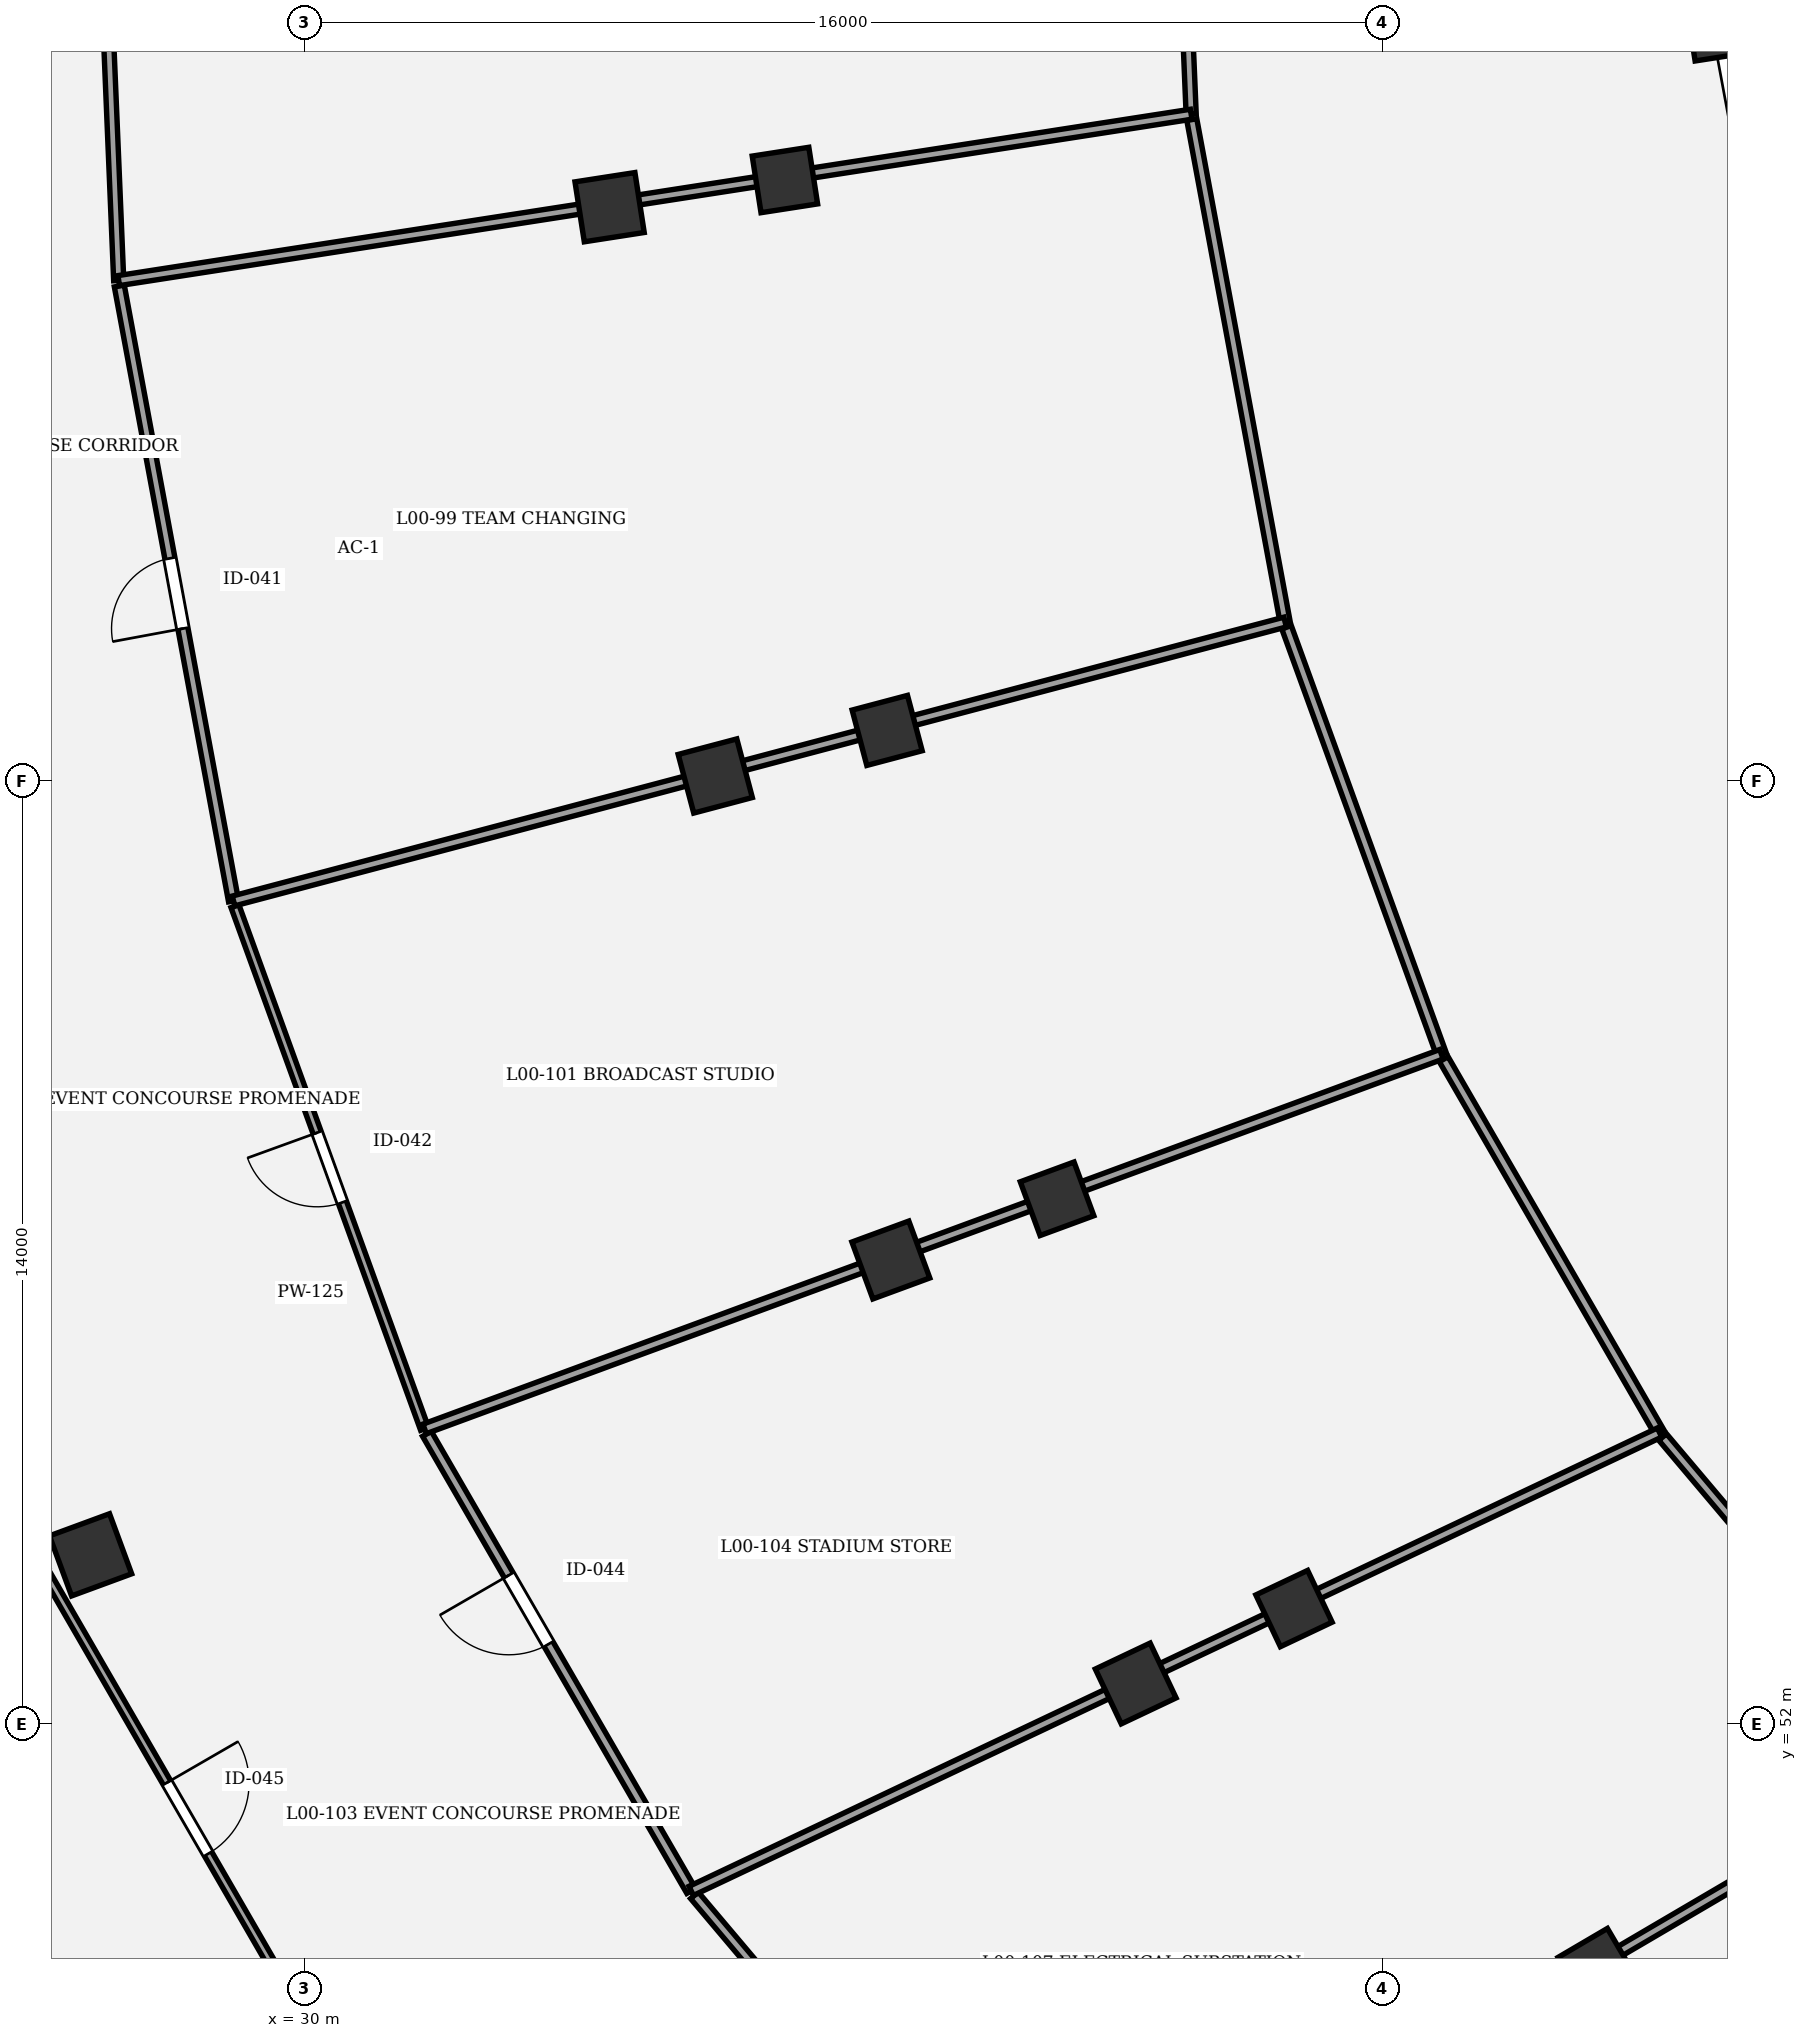
"""IFC4 building model, lengths in metres.
Left out: names, types, materials, properties, quantities, classifications, styles, units other than length and angle.
Written with IfcOpenShell. Run it as: python <this file> out.ifc"""

import sys

from ifc_helpers import new_model, si_unit, direction, frame, frame_2d, origin, origin_2d, place, context, subcontext, project, spatial, rectangle, extrude, element, fill, save


model = new_model("IFC4")
c1 = context("Model", 3, precision=1e-05, world=origin(), true_north=direction((0.0, 1.0)))
c2 = subcontext(c1, "Body", "Model", "MODEL_VIEW")
j1 = project(units=[si_unit("LENGTHUNIT", "METRE"), si_unit("PLANEANGLEUNIT", "RADIAN")], contexts=[c1])
p1 = place(None, origin())
s1 = spatial("IfcSite", under=j1, at=p1, CompositionType="ELEMENT")
p2 = place(p1, origin())
s2 = spatial("IfcBuilding", under=s1, at=p2, CompositionType="ELEMENT")
p3 = place(p2, origin())
s3 = spatial("IfcBuildingStorey", under=s2, at=p3, CompositionType="ELEMENT", Elevation=0.0)
p4 = place(p3, frame((50.912, 77.06, 0.0), z_axis=(0.0, 0.0, 1.0), x_axis=(-0.98817491911, -0.153330783737, 0.0)))
e1 = element("IfcColumn", 1, at=p4, inside=s3, PredefinedType="COLUMN", context=c2, shape_type="SweptSolid", body=[
    extrude(rectangle(XDim=0.65, YDim=0.65, at=origin_2d()), origin(), (0.0, 0.0, 1.0), 1.15),
])
p5 = place(p3, frame((37.131, 74.922, 0.0), z_axis=(0.0, 0.0, 1.0), x_axis=(-0.98817491911, -0.153330783737, 0.0)))
e2 = element("IfcColumn", 2, at=p5, inside=s3, PredefinedType="COLUMN", context=c2, shape_type="SweptSolid", body=[
    extrude(rectangle(XDim=0.85, YDim=0.85, at=origin_2d()), origin(), (0.0, 0.0, 1.0), 5.4),
])
p6 = place(p3, frame((34.529, 74.518, 0.0), z_axis=(0.0, 0.0, 1.0), x_axis=(-0.98817491911, -0.153330783737, 0.0)))
e3 = element("IfcColumn", 3, at=p6, inside=s3, PredefinedType="COLUMN", context=c2, shape_type="SweptSolid", body=[
    extrude(rectangle(XDim=0.9, YDim=0.9, at=origin_2d()), origin(), (0.0, 0.0, 1.0), 5.4),
])
p7 = place(p3, frame((38.648, 66.752, 0.0), z_axis=(0.0, 0.0, 1.0), x_axis=(-0.966600102017, -0.256289373133, 0.0)))
e4 = element("IfcColumn", 4, at=p7, inside=s3, PredefinedType="COLUMN", context=c2, shape_type="SweptSolid", body=[
    extrude(rectangle(XDim=0.85, YDim=0.85, at=origin_2d()), origin(), (0.0, 0.0, 1.0), 5.4),
])
p8 = place(p3, frame((36.097, 66.076, 0.0), z_axis=(0.0, 0.0, 1.0), x_axis=(-0.966600102017, -0.256289373133, 0.0)))
e5 = element("IfcColumn", 5, at=p8, inside=s3, PredefinedType="COLUMN", context=c2, shape_type="SweptSolid", body=[
    extrude(rectangle(XDim=0.9, YDim=0.9, at=origin_2d()), origin(), (0.0, 0.0, 1.0), 5.4),
])
p9 = place(p3, frame((41.17, 59.801, 0.0), z_axis=(0.0, 0.0, 1.0), x_axis=(-0.938372433776, -0.34562577382, 0.0)))
e6 = element("IfcColumn", 6, at=p9, inside=s3, PredefinedType="COLUMN", context=c2, shape_type="SweptSolid", body=[
    extrude(rectangle(XDim=0.85, YDim=0.85, at=origin_2d()), origin(), (0.0, 0.0, 1.0), 5.4),
])
p10 = place(p3, frame((38.703, 58.892, 0.0), z_axis=(0.0, 0.0, 1.0), x_axis=(-0.938372433776, -0.34562577382, 0.0)))
e7 = element("IfcColumn", 7, at=p10, inside=s3, PredefinedType="COLUMN", context=c2, shape_type="SweptSolid", body=[
    extrude(rectangle(XDim=0.9, YDim=0.9, at=origin_2d()), origin(), (0.0, 0.0, 1.0), 5.4),
])
p11 = place(p3, frame((26.824, 54.516, 0.0), z_axis=(0.0, 0.0, 1.0), x_axis=(-0.938372433776, -0.34562577382, 0.0)))
e8 = element("IfcColumn", 8, at=p11, inside=s3, PredefinedType="COLUMN", context=c2, shape_type="SweptSolid", body=[
    extrude(rectangle(XDim=0.95, YDim=0.95, at=origin_2d()), origin(), (0.0, 0.0, 1.0), 5.4),
])
p12 = place(p3, frame((44.687, 53.719, 0.0), z_axis=(0.0, 0.0, 1.0), x_axis=(-0.903858661687, -0.4278311813, 0.0)))
e9 = element("IfcColumn", 9, at=p12, inside=s3, PredefinedType="COLUMN", context=c2, shape_type="SweptSolid", body=[
    extrude(rectangle(XDim=0.85, YDim=0.85, at=origin_2d()), origin(), (0.0, 0.0, 1.0), 5.4),
])
p13 = place(p3, frame((42.337, 52.606, 0.0), z_axis=(0.0, 0.0, 1.0), x_axis=(-0.903858661687, -0.4278311813, 0.0)))
e10 = element("IfcColumn", 10, at=p13, inside=s3, PredefinedType="COLUMN", context=c2, shape_type="SweptSolid", body=[
    extrude(rectangle(XDim=0.9, YDim=0.9, at=origin_2d()), origin(), (0.0, 0.0, 1.0), 5.4),
])
p14 = place(p3, frame((49.188, 48.389, 0.0), z_axis=(0.0, 0.0, 1.0), x_axis=(-0.862513669207, -0.506033764121, 0.0)))
e11 = element("IfcColumn", 11, at=p14, inside=s3, PredefinedType="COLUMN", context=c2, shape_type="SweptSolid", body=[
    extrude(rectangle(XDim=0.85, YDim=0.85, at=origin_2d()), origin(), (0.0, 0.0, 1.0), 5.4),
])
p15 = place(p3, frame((27.242, 73.429, 0.0), z_axis=(0.0, 0.0, 1.0), x_axis=(-0.041894479342, 0.999122040894, 0.0)))
e12 = element("IfcWall", 12, at=p15, inside=s3, PredefinedType="PARTITIONING", context=c2, shape_type="SweptSolid", body=[
    extrude(rectangle(XDim=13.543, YDim=0.15, at=frame_2d((6.771, 0.0))), origin(), (0.0, 0.0, 1.0), 4.15),
])
p16 = place(p15, frame((6.262, 0.0, 0.0)))
e13 = element("IfcOpeningElement", 13, at=p16, cuts=e12, PredefinedType="OPENING", context=c2, shape_type="SweptSolid", body=[
    extrude(rectangle(XDim=1.02, YDim=2.1, at=frame_2d((0.51, 1.05))), frame((0.0, 0.085, 0.0), z_axis=(0.0, -1.0, 0.0), x_axis=(1.0, 0.0, 0.0)), (0.0, 0.0, 1.0), 0.17),
])
p17 = place(p3, frame((28.947, 64.221, 0.0), z_axis=(0.0, 0.0, 1.0), x_axis=(-0.182600545941, 0.983187184936, 0.0)))
e14 = element("IfcWall", 14, at=p17, inside=s3, PredefinedType="PARTITIONING", context=c2, shape_type="SweptSolid", body=[
    extrude(rectangle(XDim=9.284, YDim=0.15, at=frame_2d((4.642, 0.0))), origin(), (0.0, 0.0, 1.0), 4.15),
])
p18 = place(p17, frame((4.112, 0.0, 0.0)))
e15 = element("IfcOpeningElement", 15, at=p18, cuts=e14, PredefinedType="OPENING", context=c2, shape_type="SweptSolid", body=[
    extrude(rectangle(XDim=1.06, YDim=2.1, at=frame_2d((0.53, 1.05))), frame((0.0, 0.085, 0.0), z_axis=(0.0, -1.0, 0.0), x_axis=(1.0, 0.0, 0.0)), (0.0, 0.0, 1.0), 0.17),
])
p19 = place(p3, frame((31.782, 56.385, 0.0), z_axis=(0.0, 0.0, 1.0), x_axis=(-0.341044733968, 0.940047067669, 0.0)))
e16 = element("IfcWall", 16, at=p19, inside=s3, PredefinedType="PARTITIONING", context=c2, shape_type="SweptSolid", body=[
    extrude(rectangle(XDim=8.254, YDim=0.125, at=frame_2d((4.127, 0.0))), origin(), (0.0, 0.0, 1.0), 4.15),
])
p20 = place(p19, frame((3.577, 0.0, 0.0)))
e17 = element("IfcOpeningElement", 17, at=p20, cuts=e16, PredefinedType="OPENING", context=c2, shape_type="SweptSolid", body=[
    extrude(rectangle(XDim=1.1, YDim=2.1, at=frame_2d((0.55, 1.05))), frame((0.0, 0.073, 0.0), z_axis=(0.0, -1.0, 0.0), x_axis=(1.0, 0.0, 0.0)), (0.0, 0.0, 1.0), 0.145),
])
p21 = place(p3, frame((35.74, 49.528, 0.0), z_axis=(0.0, 0.0, 1.0), x_axis=(-0.500584301803, 0.865687794063, 0.0)))
e18 = element("IfcWall", 18, at=p21, inside=s3, PredefinedType="PARTITIONING", context=c2, shape_type="SweptSolid", body=[
    extrude(rectangle(XDim=7.837, YDim=0.15, at=frame_2d((3.918, 0.0))), origin(), (0.0, 0.0, 1.0), 4.15),
])
p22 = place(p21, frame((4.231, 0.0, 0.0)))
e19 = element("IfcOpeningElement", 19, at=p22, cuts=e18, PredefinedType="OPENING", context=c2, shape_type="SweptSolid", body=[
    extrude(rectangle(XDim=1.18, YDim=2.1, at=frame_2d((0.59, 1.05))), frame((0.0, 0.085, 0.0), z_axis=(0.0, -1.0, 0.0), x_axis=(1.0, 0.0, 0.0)), (0.0, 0.0, 1.0), 0.17),
])
p23 = place(p3, frame((26.167, 54.231, 0.0), z_axis=(0.0, 0.0, 1.0), x_axis=(0.500559280672, -0.865702262059, 0.0)))
e20 = element("IfcWall", 20, at=p23, inside=s3, PredefinedType="PARTITIONING", context=c2, shape_type="SweptSolid", body=[
    extrude(rectangle(XDim=8.375, YDim=0.125, at=frame_2d((4.187, 0.0))), origin(), (0.0, 0.0, 1.0), 4.15),
])
p24 = place(p23, frame((3.577, 0.0, 0.0)))
e21 = element("IfcOpeningElement", 21, at=p24, cuts=e20, PredefinedType="OPENING", context=c2, shape_type="SweptSolid", body=[
    extrude(rectangle(XDim=1.22, YDim=2.1, at=frame_2d((0.61, 1.05))), frame((0.0, 0.073, 0.0), z_axis=(0.0, -1.0, 0.0), x_axis=(1.0, 0.0, 0.0)), (0.0, 0.0, 1.0), 0.145),
])
p25 = place(p3, frame((40.807, 43.518, 0.0), z_axis=(0.0, 0.0, 1.0), x_axis=(-0.645180817826, 0.764029915847, 0.0)))
e22 = element("IfcWall", 22, at=p25, inside=s3, PredefinedType="PARTITIONING", context=c2, shape_type="SweptSolid", body=[
    extrude(rectangle(XDim=7.779, YDim=0.15, at=frame_2d((3.89, 0.0))), origin(), (0.0, 0.0, 1.0), 4.15),
])
p26 = place(p25, frame((4.142, 0.0, 0.0)))
e23 = element("IfcOpeningElement", 23, at=p26, cuts=e22, PredefinedType="OPENING", context=c2, shape_type="SweptSolid", body=[
    extrude(rectangle(XDim=1.26, YDim=2.1, at=frame_2d((0.63, 1.05))), frame((0.0, 0.085, 0.0), z_axis=(0.0, -1.0, 0.0), x_axis=(1.0, 0.0, 0.0)), (0.0, 0.0, 1.0), 0.17),
])
p27 = place(p3, frame((42.697, 86.96, 0.0), z_axis=(0.0, 0.0, 1.0), x_axis=(0.041917617243, -0.999121070424, 0.0)))
e24 = element("IfcWall", 24, at=p27, inside=s3, PredefinedType="PARTITIONING", context=c2, shape_type="SweptSolid", body=[
    extrude(rectangle(XDim=11.072, YDim=0.15, at=frame_2d((5.536, 0.0))), origin(), (0.0, 0.0, 1.0), 4.15),
])
p28 = place(p3, frame((43.161, 75.898, 0.0), z_axis=(0.0, 0.0, 1.0), x_axis=(-0.988184353902, -0.153269966734, 0.0)))
e25 = element("IfcWall", 25, at=p28, inside=s3, PredefinedType="PARTITIONING", context=c2, shape_type="SweptSolid", body=[
    extrude(rectangle(XDim=16.109, YDim=0.15, at=frame_2d((8.054, 0.0))), origin(), (0.0, 0.0, 1.0), 4.15),
])
p29 = place(p3, frame((43.17, 75.818, 0.0), z_axis=(0.0, 0.0, 1.0), x_axis=(0.182622862121, -0.983183040044, 0.0)))
e26 = element("IfcWall", 26, at=p29, inside=s3, PredefinedType="PARTITIONING", context=c2, shape_type="SweptSolid", body=[
    extrude(rectangle(XDim=7.585, YDim=0.15, at=frame_2d((3.792, 0.0))), origin(), (0.0, 0.0, 1.0), 4.15),
])
p30 = place(p3, frame((44.555, 68.36, 0.0), z_axis=(0.0, 0.0, 1.0), x_axis=(-0.966587096108, -0.256338420135, 0.0)))
e27 = element("IfcWall", 27, at=p30, inside=s3, PredefinedType="PARTITIONING", context=c2, shape_type="SweptSolid", body=[
    extrude(rectangle(XDim=16.148, YDim=0.15, at=frame_2d((8.074, 0.0))), origin(), (0.0, 0.0, 1.0), 4.15),
])
p31 = place(p3, frame((44.576, 68.283, 0.0), z_axis=(0.0, 0.0, 1.0), x_axis=(0.341039355212, -0.940049019039, 0.0)))
e28 = element("IfcWall", 28, at=p31, inside=s3, PredefinedType="PARTITIONING", context=c2, shape_type="SweptSolid", body=[
    extrude(rectangle(XDim=6.742, YDim=0.15, at=frame_2d((3.371, 0.0))), origin(), (0.0, 0.0, 1.0), 4.15),
])
p32 = place(p3, frame((46.875, 61.945, 0.0), z_axis=(0.0, 0.0, 1.0), x_axis=(-0.938343894245, -0.345703248659, 0.0)))
e29 = element("IfcWall", 29, at=p32, inside=s3, PredefinedType="PARTITIONING", context=c2, shape_type="SweptSolid", body=[
    extrude(rectangle(XDim=16.085, YDim=0.15, at=frame_2d((8.042, 0.0))), origin(), (0.0, 0.0, 1.0), 4.15),
])
p33 = place(p3, frame((46.909, 61.872, 0.0), z_axis=(0.0, 0.0, 1.0), x_axis=(0.500568608351, -0.865696868617, 0.0)))
e30 = element("IfcWall", 30, at=p33, inside=s3, PredefinedType="PARTITIONING", context=c2, shape_type="SweptSolid", body=[
    extrude(rectangle(XDim=6.401, YDim=0.15, at=frame_2d((3.2, 0.0))), origin(), (0.0, 0.0, 1.0), 4.15),
])
p34 = place(p3, frame((50.113, 56.331, 0.0), z_axis=(0.0, 0.0, 1.0), x_axis=(-0.903858162526, -0.427832235854, 0.0)))
e31 = element("IfcWall", 31, at=p34, inside=s3, PredefinedType="PARTITIONING", context=c2, shape_type="SweptSolid", body=[
    extrude(rectangle(XDim=15.902, YDim=0.15, at=frame_2d((7.951, 0.0))), origin(), (0.0, 0.0, 1.0), 4.15),
])
p35 = place(p3, frame((50.158, 56.264, 0.0), z_axis=(0.0, 0.0, 1.0), x_axis=(0.645182313149, -0.764028653127, 0.0)))
e32 = element("IfcWall", 32, at=p35, inside=s3, PredefinedType="PARTITIONING", context=c2, shape_type="SweptSolid", body=[
    extrude(rectangle(XDim=6.354, YDim=0.15, at=frame_2d((3.177, 0.0))), origin(), (0.0, 0.0, 1.0), 4.15),
])
p36 = place(p3, frame((54.258, 51.41, 0.0), z_axis=(0.0, 0.0, 1.0), x_axis=(-0.86252080612, -0.506021599351, 0.0)))
e33 = element("IfcWall", 33, at=p36, inside=s3, PredefinedType="PARTITIONING", context=c2, shape_type="SweptSolid", body=[
    extrude(rectangle(XDim=15.595, YDim=0.15, at=frame_2d((7.797, 0.0))), origin(), (0.0, 0.0, 1.0), 4.15),
])
p37 = place(p18, origin())
e34 = element("IfcDoor", 34, at=p37, inside=s3, OperationType="SINGLE_SWING_LEFT", PredefinedType="DOOR", context=c2, shape_type="SweptSolid", body=[
    extrude(rectangle(XDim=1.06, YDim=2.1, at=frame_2d((0.53, 1.05))), frame((0.0, 0.025, 0.0), z_axis=(0.0, -1.0, 0.0), x_axis=(1.0, 0.0, 0.0)), (0.0, 0.0, 1.0), 0.05),
])
fill(e15, e34)
p38 = place(p20, origin())
e35 = element("IfcDoor", 35, at=p38, inside=s3, OperationType="SINGLE_SWING_RIGHT", PredefinedType="DOOR", context=c2, shape_type="SweptSolid", body=[
    extrude(rectangle(XDim=1.1, YDim=2.1, at=frame_2d((0.55, 1.05))), frame((0.0, 0.025, 0.0), z_axis=(0.0, -1.0, 0.0), x_axis=(1.0, 0.0, 0.0)), (0.0, 0.0, 1.0), 0.05),
])
fill(e17, e35)
p39 = place(p22, origin())
e36 = element("IfcDoor", 36, at=p39, inside=s3, OperationType="SINGLE_SWING_RIGHT", PredefinedType="DOOR", context=c2, shape_type="SweptSolid", body=[
    extrude(rectangle(XDim=1.18, YDim=2.1, at=frame_2d((0.59, 1.05))), frame((0.0, 0.025, 0.0), z_axis=(0.0, -1.0, 0.0), x_axis=(1.0, 0.0, 0.0)), (0.0, 0.0, 1.0), 0.05),
])
fill(e19, e36)
p40 = place(p24, origin())
e37 = element("IfcDoor", 37, at=p40, inside=s3, OperationType="SINGLE_SWING_LEFT", PredefinedType="DOOR", context=c2, shape_type="SweptSolid", body=[
    extrude(rectangle(XDim=1.22, YDim=2.1, at=frame_2d((0.61, 1.05))), frame((0.0, 0.025, 0.0), z_axis=(0.0, -1.0, 0.0), x_axis=(1.0, 0.0, 0.0)), (0.0, 0.0, 1.0), 0.05),
])
fill(e21, e37)
save(model, sys.argv[1])
